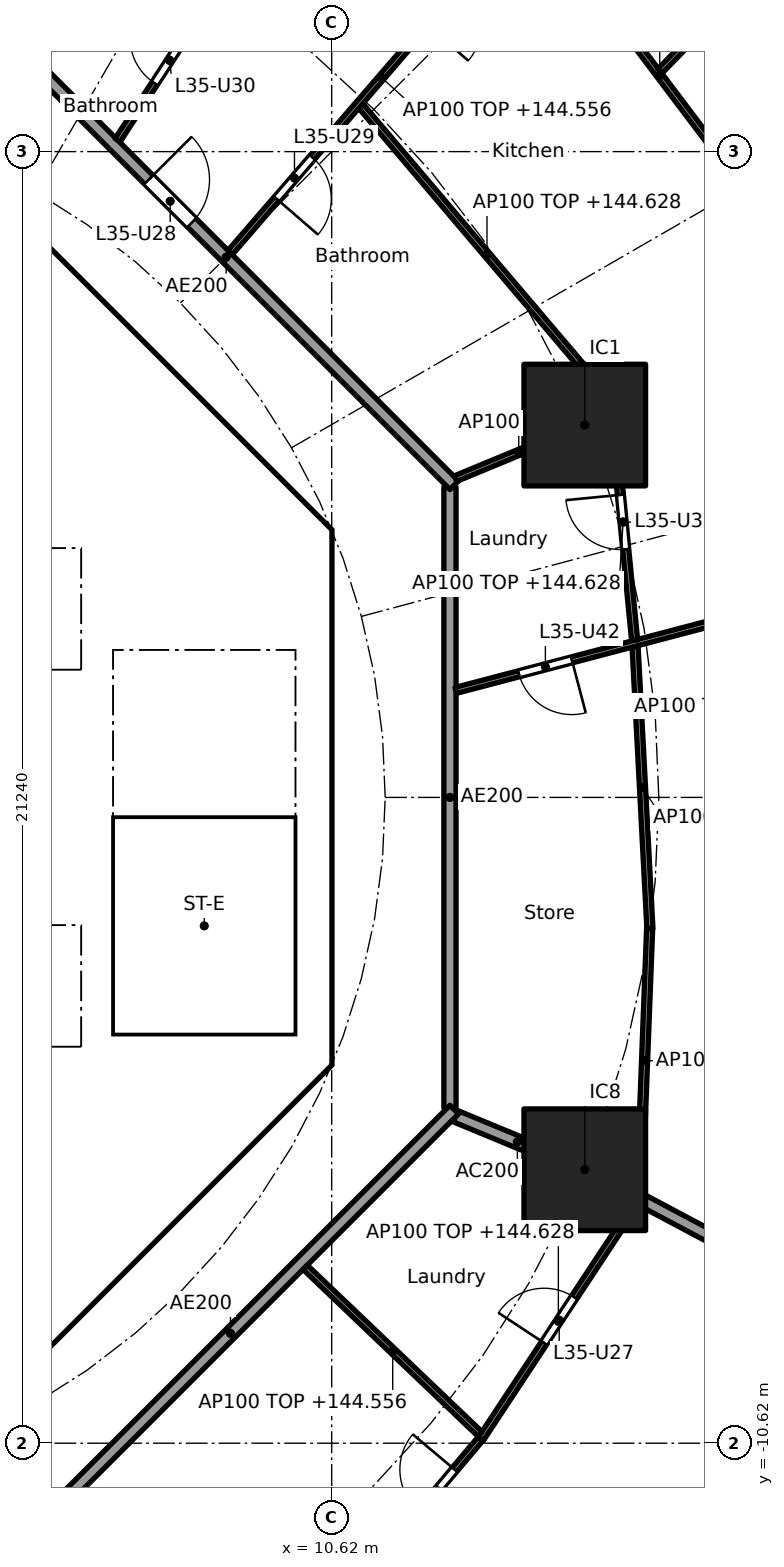
"""IFC4 building model, lengths in metres.
Left out: names, types, materials, properties, quantities, classifications, styles, units other than length and angle.
Written with IfcOpenShell. Run it as: python <this file> out.ifc"""

import sys

from ifc_helpers import new_model, si_unit, direction, frame, frame_2d, origin, origin_2d, place, context, subcontext, project, spatial, polyline, rectangle, outline, extrude, element, fill, save


model = new_model("IFC4")
c1 = context("Model", 3, precision=1e-05, world=origin(), true_north=direction((0.0, 1.0)))
c2 = subcontext(c1, "Body", "Model", "MODEL_VIEW")
j1 = project(units=[si_unit("LENGTHUNIT", "METRE"), si_unit("PLANEANGLEUNIT", "RADIAN")], contexts=[c1])
p1 = place(None, origin())
s1 = spatial("IfcSite", under=j1, at=p1, CompositionType="ELEMENT")
p2 = place(p1, origin())
s2 = spatial("IfcBuilding", under=s1, at=p2, CompositionType="ELEMENT")
p3 = place(p2, frame((0.0, 0.0, 141.8)))
s3 = spatial("IfcBuildingStorey", under=s2, at=p3, CompositionType="ELEMENT", Elevation=141.8)
for number, where, z_axis, x_axis in (
    (1, (14.782, 6.123, 0.0), (0.0, 0.0, 1.0), (1.0, 0.0, 0.0)),
    (2, (14.782, -6.123, 0.0), (0.0, 0.0, 1.0), (1.0, 0.0, 0.0)),
):
    element("IfcColumn", number, at=place(p3, frame(where, z_axis=z_axis, x_axis=x_axis)), inside=s3, PredefinedType="COLUMN", context=c2, shape_type="SweptSolid", body=[
        extrude(rectangle(XDim=2.0, YDim=2.0, at=origin_2d()), origin(), (0.0, 0.0, 1.0), 3.7),
    ])
p4 = place(p3, frame((9.988, 4.613, 0.0), z_axis=(0.0, 0.0, 1.0), x_axis=(-0.707106781187, 0.707106781187, 0.0)))
e3 = element("IfcWall", 3, at=p4, inside=s3, PredefinedType="SHEAR", context=c2, shape_type="SweptSolid", body=[
    extrude(rectangle(XDim=7.602, YDim=0.6, at=frame_2d((3.801, 0.0))), origin(), (0.0, 0.0, 1.0), 3.44),
])
p5 = place(p4, frame((3.201, 0.0, 0.0)))
e4 = element("IfcOpeningElement", 4, at=p5, cuts=e3, PredefinedType="OPENING", context=c2, shape_type="SweptSolid", body=[
    extrude(rectangle(XDim=1.2, YDim=2.1, at=frame_2d((0.6, 1.05))), frame((0.0, 0.31, 0.0), z_axis=(0.0, -1.0, 0.0), x_axis=(1.0, 0.0, 0.0)), (0.0, 0.0, 1.0), 0.62),
])
p6 = place(p3, frame((4.613, -9.988, 0.0), z_axis=(0.0, 0.0, 1.0), x_axis=(0.707106781187, 0.707106781187, 0.0)))
e5 = element("IfcWall", 5, at=p6, inside=s3, PredefinedType="SHEAR", context=c2, shape_type="SweptSolid", body=[
    extrude(rectangle(XDim=7.602, YDim=0.6, at=frame_2d((3.801, 0.0))), origin(), (0.0, 0.0, 1.0), 3.44),
])
p7 = place(p6, frame((3.201, 0.0, 0.0)))
e6 = element("IfcOpeningElement", 6, at=p7, cuts=e5, PredefinedType="OPENING", context=c2, shape_type="SweptSolid", body=[
    extrude(rectangle(XDim=1.2, YDim=2.1, at=frame_2d((0.6, 1.05))), frame((0.0, 0.31, 0.0), z_axis=(0.0, -1.0, 0.0), x_axis=(1.0, 0.0, 0.0)), (0.0, 0.0, 1.0), 0.62),
])
p8 = place(p3, frame((-6.7, 2.0, 0.0), z_axis=(0.0, 0.0, 1.0), x_axis=(1.0, 0.0, 0.0)))
e7 = element("IfcWall", 7, at=p8, inside=s3, PredefinedType="SOLIDWALL", context=c2, shape_type="SweptSolid", body=[
    extrude(rectangle(XDim=13.4, YDim=0.2, at=frame_2d((6.7, 0.0))), origin(), (0.0, 0.0, 1.0), 3.44),
])
p9 = place(p8, frame((0.65, 0.0, 0.0)))
e8 = element("IfcOpeningElement", 8, at=p9, cuts=e7, PredefinedType="OPENING", context=c2, shape_type="SweptSolid", body=[
    extrude(rectangle(XDim=1.1, YDim=2.1, at=frame_2d((0.55, 1.05))), frame((0.0, 0.11, 0.0), z_axis=(0.0, -1.0, 0.0), x_axis=(1.0, 0.0, 0.0)), (0.0, 0.0, 1.0), 0.22),
])
p10 = place(p8, frame((2.85, 0.0, 0.0)))
e9 = element("IfcOpeningElement", 9, at=p10, cuts=e7, PredefinedType="OPENING", context=c2, shape_type="SweptSolid", body=[
    extrude(rectangle(XDim=1.1, YDim=2.1, at=frame_2d((0.55, 1.05))), frame((0.0, 0.11, 0.0), z_axis=(0.0, -1.0, 0.0), x_axis=(1.0, 0.0, 0.0)), (0.0, 0.0, 1.0), 0.22),
])
p11 = place(p8, frame((5.05, 0.0, 0.0)))
e10 = element("IfcOpeningElement", 10, at=p11, cuts=e7, PredefinedType="OPENING", context=c2, shape_type="SweptSolid", body=[
    extrude(rectangle(XDim=1.1, YDim=2.1, at=frame_2d((0.55, 1.05))), frame((0.0, 0.11, 0.0), z_axis=(0.0, -1.0, 0.0), x_axis=(1.0, 0.0, 0.0)), (0.0, 0.0, 1.0), 0.22),
])
p12 = place(p3, frame((6.7, 4.0, 0.0), z_axis=(0.0, 0.0, 1.0), x_axis=(1.0, 0.0, 0.0)))
e11 = element("IfcWall", 11, at=p12, inside=s3, PredefinedType="SOLIDWALL", context=c2, shape_type="SweptSolid", body=[
    extrude(rectangle(XDim=3.325, YDim=0.2, at=frame_2d((1.662, 0.0))), origin(), (0.0, 0.0, 1.0), 3.44),
])
p13 = place(p12, frame((1.25, 0.0, 0.0)))
e12 = element("IfcOpeningElement", 12, at=p13, cuts=e11, PredefinedType="OPENING", context=c2, shape_type="SweptSolid", body=[
    extrude(rectangle(XDim=1.1, YDim=2.1, at=frame_2d((0.55, 1.05))), frame((0.0, 0.11, 0.0), z_axis=(0.0, -1.0, 0.0), x_axis=(1.0, 0.0, 0.0)), (0.0, 0.0, 1.0), 0.22),
])
p14 = place(p3, frame((-6.7, -2.0, 0.0), z_axis=(0.0, 0.0, 1.0), x_axis=(1.0, 0.0, 0.0)))
e13 = element("IfcWall", 13, at=p14, inside=s3, PredefinedType="SOLIDWALL", context=c2, shape_type="SweptSolid", body=[
    extrude(rectangle(XDim=13.4, YDim=0.2, at=frame_2d((6.7, 0.0))), origin(), (0.0, 0.0, 1.0), 3.44),
])
p15 = place(p14, frame((0.65, 0.0, 0.0)))
e14 = element("IfcOpeningElement", 14, at=p15, cuts=e13, PredefinedType="OPENING", context=c2, shape_type="SweptSolid", body=[
    extrude(rectangle(XDim=1.1, YDim=2.1, at=frame_2d((0.55, 1.05))), frame((0.0, 0.11, 0.0), z_axis=(0.0, -1.0, 0.0), x_axis=(1.0, 0.0, 0.0)), (0.0, 0.0, 1.0), 0.22),
])
p16 = place(p14, frame((2.85, 0.0, 0.0)))
e15 = element("IfcOpeningElement", 15, at=p16, cuts=e13, PredefinedType="OPENING", context=c2, shape_type="SweptSolid", body=[
    extrude(rectangle(XDim=1.1, YDim=2.1, at=frame_2d((0.55, 1.05))), frame((0.0, 0.11, 0.0), z_axis=(0.0, -1.0, 0.0), x_axis=(1.0, 0.0, 0.0)), (0.0, 0.0, 1.0), 0.22),
])
p17 = place(p3, origin())
e16 = element("IfcWall", 16, at=p17, inside=s3, PredefinedType="SHEAR", context=c2, shape_type="SweptSolid", body=[
    extrude(outline(polyline([(9.776, -4.401), (10.025, -4.152), (10.025, -3.801), (10.025, 4.152), (9.776, 4.401), (10.2, 4.825), (10.625, 4.401), (10.625, -4.401), (10.2, -4.825), (9.776, -4.401)])), origin(), (0.0, 0.0, 1.0), 3.44),
])
p18 = place(p3, origin())
e17 = element("IfcWall", 17, at=p18, inside=s3, PredefinedType="SOLIDWALL", context=c2, shape_type="SweptSolid", body=[
    extrude(outline(polyline([(-6.7, -2.1), (-6.5, -2.1), (-6.5, -4.1), (-4.5, -4.1), (-4.5, -2.1), (-4.3, -2.1), (-4.3, -4.1), (-2.3, -4.1), (-2.3, -2.1), (-2.1, -2.1), (-2.1, -4.1), (-0.1, -4.1), (-0.1, -2.1), (0.1, -2.1), (0.1, -4.1), (2.1, -4.1), (2.1, -2.1), (2.3, -2.1), (2.3, -4.1), (4.3, -4.1), (4.3, -2.1), (4.5, -2.1), (4.5, -4.1), (6.5, -4.1), (6.5, -2.1), (6.7, -2.1), (6.7, -4.3), (-6.7, -4.3), (-6.7, -2.1)])), origin(), (0.0, 0.0, 1.0), 3.44),
])
p19 = place(p3, origin())
e18 = element("IfcWall", 18, at=p19, inside=s3, PredefinedType="SOLIDWALL", context=c2, shape_type="SweptSolid", body=[
    extrude(outline(polyline([(-6.5, 2.1), (-6.7, 2.1), (-6.7, 4.3), (6.7, 4.3), (6.7, 2.1), (6.5, 2.1), (6.5, 4.1), (4.5, 4.1), (4.5, 2.1), (4.3, 2.1), (4.3, 4.1), (2.3, 4.1), (2.3, 2.1), (2.1, 2.1), (2.1, 4.1), (0.1, 4.1), (0.1, 2.1), (-0.1, 2.1), (-0.1, 4.1), (-2.1, 4.1), (-2.1, 2.1), (-2.3, 2.1), (-2.3, 4.1), (-4.3, 4.1), (-4.3, 2.1), (-4.5, 2.1), (-4.5, 4.1), (-6.5, 4.1), (-6.5, 2.1)])), origin(), (0.0, 0.0, 1.0), 3.44),
])
p20 = place(p3, origin())
e19 = element("IfcWall", 19, at=p20, inside=s3, PredefinedType="SOLIDWALL", context=c2, shape_type="SweptSolid", body=[
    extrude(outline(polyline([(7.025, -3.9), (6.7, -3.9), (6.7, 3.9), (7.025, 3.9), (7.025, -3.9)])), origin(), (0.0, 0.0, 1.0), 3.44),
])
p21 = place(p3, origin())
e20 = element("IfcWall", 20, at=p21, inside=s3, PredefinedType="SOLIDWALL", context=c2, shape_type="SweptSolid", body=[
    extrude(outline(polyline([(10.025, -4.1), (6.7, -4.1), (6.7, -3.9), (10.025, -3.9), (10.025, -4.1)])), origin(), (0.0, 0.0, 1.0), 3.44),
])
p22 = place(p3, frame((12.657, -5.243, 0.0), z_axis=(0.0, 0.0, 1.0), x_axis=(0.923846436004, -0.382763324632, 0.0)))
e21 = element("IfcWall", 21, at=p22, inside=s3, PredefinedType="PARTITIONING", context=c2, shape_type="SweptSolid", body=[
    extrude(rectangle(XDim=2.2, YDim=0.2, at=frame_2d((1.1, 0.0))), origin(), (0.0, 0.0, 1.0), 3.44),
])
p23 = place(p3, frame((14.826, -6.146, 0.0), z_axis=(0.0, 0.0, 1.0), x_axis=(0.883012998471, -0.469348532044, 0.0)))
e22 = element("IfcWall", 22, at=p23, inside=s3, PredefinedType="PARTITIONING", context=c2, shape_type="SweptSolid", body=[
    extrude(rectangle(XDim=9.172, YDim=0.2, at=frame_2d((4.586, 0.0))), origin(), (0.0, 0.0, 1.0), 2.828),
])
p24 = place(p3, frame((12.565, -5.104, 0.0), z_axis=(0.0, 0.0, 1.0), x_axis=(0.0, 1.0, 0.0)))
e23 = element("IfcWall", 23, at=p24, inside=s3, PredefinedType="PARTITIONING", context=c2, shape_type="SweptSolid", body=[
    extrude(rectangle(XDim=10.209, YDim=0.2, at=frame_2d((5.104, 0.0))), origin(), (0.0, 0.0, 1.0), 3.44),
])
p25 = place(p3, frame((12.635, 5.134, 0.0), z_axis=(0.0, 0.0, 1.0), x_axis=(-0.707106781187, 0.707106781187, 0.0)))
e24 = element("IfcWall", 24, at=p25, inside=s3, PredefinedType="PARTITIONING", context=c2, shape_type="SweptSolid", body=[
    extrude(rectangle(XDim=10.609, YDim=0.2, at=frame_2d((5.305, 0.0))), origin(), (0.0, 0.0, 1.0), 3.44),
])
p26 = place(p25, frame((6.106, 0.0, 0.0)))
e25 = element("IfcOpeningElement", 25, at=p26, cuts=e24, PredefinedType="OPENING", context=c2, shape_type="SweptSolid", body=[
    extrude(rectangle(XDim=1.0, YDim=2.1, at=frame_2d((0.5, 1.05))), frame((0.0, 0.11, 0.0), z_axis=(0.0, -1.0, 0.0), x_axis=(1.0, 0.0, 0.0)), (0.0, 0.0, 1.0), 0.22),
])
p27 = place(p3, frame((5.275, -12.494, 0.0), z_axis=(0.0, 0.0, 1.0), x_axis=(0.707106781187, 0.707106781187, 0.0)))
e26 = element("IfcWall", 26, at=p27, inside=s3, PredefinedType="PARTITIONING", context=c2, shape_type="SweptSolid", body=[
    extrude(rectangle(XDim=10.409, YDim=0.2, at=frame_2d((5.205, 0.0))), origin(), (0.0, 0.0, 1.0), 3.44),
])
p28 = place(p3, frame((15.853, -2.158, 0.0), z_axis=(0.0, 0.0, 1.0), x_axis=(-0.052509224895, 0.998620439056, 0.0)))
e27 = element("IfcWall", 27, at=p28, inside=s3, PredefinedType="PARTITIONING", context=c2, shape_type="SweptSolid", body=[
    extrude(rectangle(XDim=4.649, YDim=0.1, at=frame_2d((2.325, 0.0))), origin(), (0.0, 0.0, 1.0), 2.828),
])
p29 = place(p3, frame((15.849, -2.158, 0.0), z_axis=(0.0, 0.0, 1.0), x_axis=(-0.03838348155, -0.999263082648, 0.0)))
e28 = element("IfcWall", 28, at=p29, inside=s3, PredefinedType="PARTITIONING", context=c2, shape_type="SweptSolid", body=[
    extrude(rectangle(XDim=4.344, YDim=0.1, at=frame_2d((2.172, 0.0))), origin(), (0.0, 0.0, 1.0), 3.44),
])
p30 = place(p3, frame((12.661, 1.76, 0.0), z_axis=(0.0, 0.0, 1.0), x_axis=(0.967120304949, 0.254319318488, 0.0)))
e29 = element("IfcWall", 29, at=p30, inside=s3, PredefinedType="PARTITIONING", context=c2, shape_type="SweptSolid", body=[
    extrude(rectangle(XDim=10.499, YDim=0.1, at=frame_2d((5.25, 0.0))), origin(), (0.0, 0.0, 1.0), 2.756),
])
p31 = place(p30, frame((4.634, 0.0, 0.0)))
e30 = element("IfcOpeningElement", 30, at=p31, cuts=e29, PredefinedType="OPENING", context=c2, shape_type="SweptSolid", body=[
    extrude(rectangle(XDim=0.9, YDim=2.1, at=frame_2d((0.45, 1.05))), frame((0.0, 0.06, 0.0), z_axis=(0.0, -1.0, 0.0), x_axis=(1.0, 0.0, 0.0)), (0.0, 0.0, 1.0), 0.12),
])
p32 = place(p30, frame((1.073, 0.0, 0.0)))
e31 = element("IfcOpeningElement", 31, at=p32, cuts=e29, PredefinedType="OPENING", context=c2, shape_type="SweptSolid", body=[
    extrude(rectangle(XDim=0.9, YDim=2.1, at=frame_2d((0.45, 1.05))), frame((0.0, 0.06, 0.0), z_axis=(0.0, -1.0, 0.0), x_axis=(1.0, 0.0, 0.0)), (0.0, 0.0, 1.0), 0.12),
])
p33 = place(p3, frame((15.602, 2.584, 0.0), z_axis=(0.0, 0.0, 1.0), x_axis=(-0.097207196705, 0.995264166394, 0.0)))
e32 = element("IfcWall", 32, at=p33, inside=s3, PredefinedType="PARTITIONING", context=c2, shape_type="SweptSolid", body=[
    extrude(rectangle(XDim=3.906, YDim=0.1, at=frame_2d((1.953, 0.0))), origin(), (0.0, 0.0, 1.0), 2.828),
])
p34 = place(p33, frame((1.503, 0.0, 0.0)))
e33 = element("IfcOpeningElement", 33, at=p34, cuts=e32, PredefinedType="OPENING", context=c2, shape_type="SweptSolid", body=[
    extrude(rectangle(XDim=0.9, YDim=2.1, at=frame_2d((0.45, 1.05))), frame((0.0, 0.06, 0.0), z_axis=(0.0, -1.0, 0.0), x_axis=(1.0, 0.0, 0.0)), (0.0, 0.0, 1.0), 0.12),
])
p35 = place(p3, frame((12.657, 5.243, 0.0), z_axis=(0.0, 0.0, 1.0), x_axis=(0.923864733477, 0.382719158442, 0.0)))
e34 = element("IfcWall", 34, at=p35, inside=s3, PredefinedType="PARTITIONING", context=c2, shape_type="SweptSolid", body=[
    extrude(rectangle(XDim=2.25, YDim=0.1, at=frame_2d((1.125, 0.0))), origin(), (0.0, 0.0, 1.0), 3.44),
])
p36 = place(p3, frame((15.25, 6.483, 0.0), z_axis=(0.0, 0.0, 1.0), x_axis=(-0.647379829894, 0.762167537912, 0.0)))
e35 = element("IfcWall", 35, at=p36, inside=s3, PredefinedType="PARTITIONING", context=c2, shape_type="SweptSolid", body=[
    extrude(rectangle(XDim=6.413, YDim=0.1, at=frame_2d((3.206, 0.0))), origin(), (0.0, 0.0, 1.0), 2.828),
])
p37 = place(p3, frame((18.106, 9.098, 0.0), z_axis=(0.0, 0.0, 1.0), x_axis=(-0.602393803621, 0.798199038686, 0.0)))
e36 = element("IfcWall", 36, at=p37, inside=s3, PredefinedType="PARTITIONING", context=c2, shape_type="SweptSolid", body=[
    extrude(rectangle(XDim=6.944, YDim=0.1, at=frame_2d((3.472, 0.0))), origin(), (0.0, 0.0, 1.0), 2.828),
])
p38 = place(p3, frame((16.02, 11.946, 0.0), z_axis=(0.0, 0.0, 1.0), x_axis=(0.697741638446, 0.71634949988, 0.0)))
e37 = element("IfcWall", 37, at=p38, inside=s3, PredefinedType="PARTITIONING", context=c2, shape_type="SweptSolid", body=[
    extrude(rectangle(XDim=4.592, YDim=0.1, at=frame_2d((2.296, 0.0))), origin(), (0.0, 0.0, 1.0), 2.905),
])
p39 = place(p3, frame((8.95, 8.96, 0.0), z_axis=(0.0, 0.0, 1.0), x_axis=(0.653829477183, 0.756641932995, 0.0)))
e38 = element("IfcWall", 38, at=p39, inside=s3, PredefinedType="PARTITIONING", context=c2, shape_type="SweptSolid", body=[
    extrude(rectangle(XDim=7.611, YDim=0.1, at=frame_2d((3.805, 0.0))), origin(), (0.0, 0.0, 1.0), 2.756),
])
p40 = place(p39, frame((1.168, 0.0, 0.0)))
e39 = element("IfcOpeningElement", 39, at=p40, cuts=e38, PredefinedType="OPENING", context=c2, shape_type="SweptSolid", body=[
    extrude(rectangle(XDim=0.9, YDim=2.1, at=frame_2d((0.45, 1.05))), frame((0.0, 0.06, 0.0), z_axis=(0.0, -1.0, 0.0), x_axis=(1.0, 0.0, 0.0)), (0.0, 0.0, 1.0), 0.12),
])
p41 = place(p39, frame((4.948, 0.0, 0.0)))
e40 = element("IfcOpeningElement", 40, at=p41, cuts=e38, PredefinedType="OPENING", context=c2, shape_type="SweptSolid", body=[
    extrude(rectangle(XDim=0.9, YDim=2.1, at=frame_2d((0.45, 1.05))), frame((0.0, 0.06, 0.0), z_axis=(0.0, -1.0, 0.0), x_axis=(1.0, 0.0, 0.0)), (0.0, 0.0, 1.0), 0.12),
])
p42 = place(p3, frame((7.099, 10.808, 0.0), z_axis=(0.0, 0.0, 1.0), x_axis=(0.546709757921, 0.837322184463, 0.0)))
e41 = element("IfcWall", 41, at=p42, inside=s3, PredefinedType="PARTITIONING", context=c2, shape_type="SweptSolid", body=[
    extrude(rectangle(XDim=3.134, YDim=0.1, at=frame_2d((1.567, 0.0))), origin(), (0.0, 0.0, 1.0), 2.756),
])
p43 = place(p42, frame((1.117, 0.0, 0.0)))
e42 = element("IfcOpeningElement", 42, at=p43, cuts=e41, PredefinedType="OPENING", context=c2, shape_type="SweptSolid", body=[
    extrude(rectangle(XDim=0.9, YDim=2.1, at=frame_2d((0.45, 1.05))), frame((0.0, 0.06, 0.0), z_axis=(0.0, -1.0, 0.0), x_axis=(1.0, 0.0, 0.0)), (0.0, 0.0, 1.0), 0.12),
])
p44 = place(p3, frame((10.138, -14.026, 0.0), z_axis=(0.0, 0.0, 1.0), x_axis=(0.644051444483, 0.764982180746, 0.0)))
e43 = element("IfcWall", 43, at=p44, inside=s3, PredefinedType="PARTITIONING", context=c2, shape_type="SweptSolid", body=[
    extrude(rectangle(XDim=4.548, YDim=0.1, at=frame_2d((2.274, 0.0))), origin(), (0.0, 0.0, 1.0), 2.828),
])
p45 = place(p44, frame((2.986, 0.0, 0.0)))
e44 = element("IfcOpeningElement", 44, at=p45, cuts=e43, PredefinedType="OPENING", context=c2, shape_type="SweptSolid", body=[
    extrude(rectangle(XDim=0.9, YDim=2.1, at=frame_2d((0.45, 1.05))), frame((0.0, 0.06, 0.0), z_axis=(0.0, -1.0, 0.0), x_axis=(1.0, 0.0, 0.0)), (0.0, 0.0, 1.0), 0.12),
])
p46 = place(p3, frame((10.184, -7.727, 0.0), z_axis=(0.0, 0.0, 1.0), x_axis=(0.723654892782, -0.690162007179, 0.0)))
e45 = element("IfcWall", 45, at=p46, inside=s3, PredefinedType="PARTITIONING", context=c2, shape_type="SweptSolid", body=[
    extrude(rectangle(XDim=3.98, YDim=0.1, at=frame_2d((1.99, 0.0))), origin(), (0.0, 0.0, 1.0), 2.756),
])
p47 = place(p3, frame((13.072, -10.55, 0.0), z_axis=(0.0, 0.0, 1.0), x_axis=(0.550607247415, 0.834764433295, 0.0)))
e46 = element("IfcWall", 46, at=p47, inside=s3, PredefinedType="PARTITIONING", context=c2, shape_type="SweptSolid", body=[
    extrude(rectangle(XDim=4.633, YDim=0.1, at=frame_2d((2.316, 0.0))), origin(), (0.0, 0.0, 1.0), 2.828),
])
p48 = place(p47, frame((1.891, 0.0, 0.0)))
e47 = element("IfcOpeningElement", 47, at=p48, cuts=e46, PredefinedType="OPENING", context=c2, shape_type="SweptSolid", body=[
    extrude(rectangle(XDim=0.9, YDim=2.1, at=frame_2d((0.45, 1.05))), frame((0.0, 0.06, 0.0), z_axis=(0.0, -1.0, 0.0), x_axis=(1.0, 0.0, 0.0)), (0.0, 0.0, 1.0), 0.12),
])
p49 = place(p13, frame((1.1, 0.0, 0.0), x_axis=(-1.0, 0.0, 0.0)))
e48 = element("IfcDoor", 48, at=p49, inside=s3, OperationType="SINGLE_SWING_RIGHT", PredefinedType="DOOR", context=c2, shape_type="SweptSolid", body=[
    extrude(rectangle(XDim=1.1, YDim=2.1, at=frame_2d((0.55, 1.05))), frame((0.0, 0.025, 0.0), z_axis=(0.0, -1.0, 0.0), x_axis=(1.0, 0.0, 0.0)), (0.0, 0.0, 1.0), 0.05),
])
fill(e12, e48)
p50 = place(p5, origin())
e49 = element("IfcDoor", 49, at=p50, inside=s3, OperationType="SINGLE_SWING_RIGHT", PredefinedType="DOOR", context=c2, shape_type="SweptSolid", body=[
    extrude(rectangle(XDim=1.2, YDim=2.1, at=frame_2d((0.6, 1.05))), frame((0.0, 0.025, 0.0), z_axis=(0.0, -1.0, 0.0), x_axis=(1.0, 0.0, 0.0)), (0.0, 0.0, 1.0), 0.05),
])
fill(e4, e49)
p51 = place(p7, origin())
e50 = element("IfcDoor", 50, at=p51, inside=s3, OperationType="SINGLE_SWING_RIGHT", PredefinedType="DOOR", context=c2, shape_type="SweptSolid", body=[
    extrude(rectangle(XDim=1.2, YDim=2.1, at=frame_2d((0.6, 1.05))), frame((0.0, 0.025, 0.0), z_axis=(0.0, -1.0, 0.0), x_axis=(1.0, 0.0, 0.0)), (0.0, 0.0, 1.0), 0.05),
])
fill(e6, e50)
p52 = place(p45, origin())
e51 = element("IfcDoor", 51, at=p52, inside=s3, OperationType="SINGLE_SWING_RIGHT", PredefinedType="DOOR", context=c2, shape_type="SweptSolid", body=[
    extrude(rectangle(XDim=0.9, YDim=2.1, at=frame_2d((0.45, 1.05))), frame((0.0, 0.025, 0.0), z_axis=(0.0, -1.0, 0.0), x_axis=(1.0, 0.0, 0.0)), (0.0, 0.0, 1.0), 0.05),
])
fill(e44, e51)
p53 = place(p48, origin())
e52 = element("IfcDoor", 52, at=p53, inside=s3, OperationType="SINGLE_SWING_LEFT", PredefinedType="DOOR", context=c2, shape_type="SweptSolid", body=[
    extrude(rectangle(XDim=0.9, YDim=2.1, at=frame_2d((0.45, 1.05))), frame((0.0, 0.025, 0.0), z_axis=(0.0, -1.0, 0.0), x_axis=(1.0, 0.0, 0.0)), (0.0, 0.0, 1.0), 0.05),
])
fill(e47, e52)
p54 = place(p26, frame((1.0, 0.0, 0.0), x_axis=(-1.0, 0.0, 0.0)))
e53 = element("IfcDoor", 53, at=p54, inside=s3, OperationType="SINGLE_SWING_LEFT", PredefinedType="DOOR", context=c2, shape_type="SweptSolid", body=[
    extrude(rectangle(XDim=1.0, YDim=2.1, at=frame_2d((0.5, 1.05))), frame((0.0, 0.025, 0.0), z_axis=(0.0, -1.0, 0.0), x_axis=(1.0, 0.0, 0.0)), (0.0, 0.0, 1.0), 0.05),
])
fill(e25, e53)
p55 = place(p40, frame((0.9, 0.0, 0.0), x_axis=(-1.0, 0.0, 0.0)))
e54 = element("IfcDoor", 54, at=p55, inside=s3, OperationType="SINGLE_SWING_RIGHT", PredefinedType="DOOR", context=c2, shape_type="SweptSolid", body=[
    extrude(rectangle(XDim=0.9, YDim=2.1, at=frame_2d((0.45, 1.05))), frame((0.0, 0.025, 0.0), z_axis=(0.0, -1.0, 0.0), x_axis=(1.0, 0.0, 0.0)), (0.0, 0.0, 1.0), 0.05),
])
fill(e39, e54)
p56 = place(p43, origin())
e55 = element("IfcDoor", 55, at=p56, inside=s3, OperationType="SINGLE_SWING_RIGHT", PredefinedType="DOOR", context=c2, shape_type="SweptSolid", body=[
    extrude(rectangle(XDim=0.9, YDim=2.1, at=frame_2d((0.45, 1.05))), frame((0.0, 0.025, 0.0), z_axis=(0.0, -1.0, 0.0), x_axis=(1.0, 0.0, 0.0)), (0.0, 0.0, 1.0), 0.05),
])
fill(e42, e55)
p57 = place(p34, origin())
e56 = element("IfcDoor", 56, at=p57, inside=s3, OperationType="SINGLE_SWING_RIGHT", PredefinedType="DOOR", context=c2, shape_type="SweptSolid", body=[
    extrude(rectangle(XDim=0.9, YDim=2.1, at=frame_2d((0.45, 1.05))), frame((0.0, 0.025, 0.0), z_axis=(0.0, -1.0, 0.0), x_axis=(1.0, 0.0, 0.0)), (0.0, 0.0, 1.0), 0.05),
])
fill(e33, e56)
p58 = place(p32, frame((0.9, 0.0, 0.0), x_axis=(-1.0, 0.0, 0.0)))
e57 = element("IfcDoor", 57, at=p58, inside=s3, OperationType="SINGLE_SWING_LEFT", PredefinedType="DOOR", context=c2, shape_type="SweptSolid", body=[
    extrude(rectangle(XDim=0.9, YDim=2.1, at=frame_2d((0.45, 1.05))), frame((0.0, 0.025, 0.0), z_axis=(0.0, -1.0, 0.0), x_axis=(1.0, 0.0, 0.0)), (0.0, 0.0, 1.0), 0.05),
])
fill(e31, e57)
save(model, sys.argv[1])
